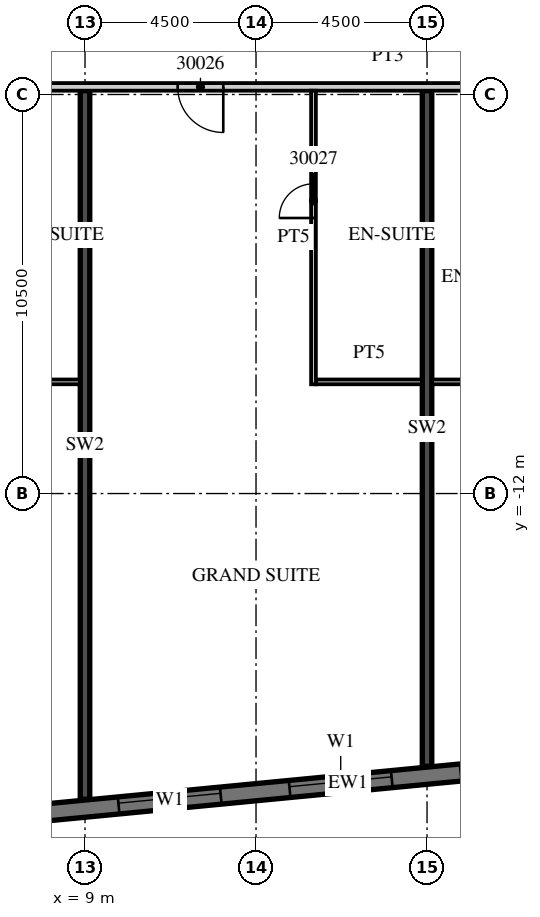
"""IFC4 building model, lengths in metres.
Left out: names, types, materials, properties, quantities, classifications, styles, units other than length and angle.
Written with IfcOpenShell. Run it as: python <this file> out.ifc"""

import sys

from ifc_helpers import new_model, si_unit, direction, frame, frame_2d, origin, place, context, subcontext, project, spatial, rectangle, extrude, element, fill, save


model = new_model("IFC4")
c1 = context("Model", 3, precision=1e-05, world=origin(), true_north=direction((0.0, 1.0)))
c2 = subcontext(c1, "Body", "Model", "MODEL_VIEW")
j1 = project(units=[si_unit("LENGTHUNIT", "METRE"), si_unit("PLANEANGLEUNIT", "RADIAN")], contexts=[c1])
p1 = place(None, origin())
s1 = spatial("IfcSite", under=j1, at=p1, CompositionType="ELEMENT")
p2 = place(p1, origin())
s2 = spatial("IfcBuilding", under=s1, at=p2, CompositionType="ELEMENT")
p3 = place(p2, frame((0.0, 0.0, 133.9)))
s3 = spatial("IfcBuildingStorey", under=s2, at=p3, CompositionType="ELEMENT", Elevation=133.9)
p4 = place(p3, frame((9.0, -20.044, 0.0), z_axis=(0.0, 0.0, 1.0), x_axis=(0.0, 1.0, 0.0)))
e1 = element("IfcWall", 1, at=p4, inside=s3, PredefinedType="SHEAR", context=c2, shape_type="SweptSolid", body=[
    extrude(rectangle(XDim=18.644, YDim=0.25, at=frame_2d((9.322, 0.0))), origin(), (0.0, 0.0, 1.0), 3.3),
])
p5 = place(p3, frame((18.0, -19.177, 0.0), z_axis=(0.0, 0.0, 1.0), x_axis=(0.0, 1.0, 0.0)))
e2 = element("IfcWall", 2, at=p5, inside=s3, PredefinedType="SHEAR", context=c2, shape_type="SweptSolid", body=[
    extrude(rectangle(XDim=17.777, YDim=0.25, at=frame_2d((8.889, 0.0))), origin(), (0.0, 0.0, 1.0), 3.3),
])
p6 = place(p3, frame((-13.521, -22.46, 0.0), z_axis=(0.0, 0.0, 1.0), x_axis=(0.995396096335, 0.095846812164, 0.0)))
e3 = element("IfcWall", 3, at=p6, inside=s3, PredefinedType="SOLIDWALL", context=c2, shape_type="SweptSolid", body=[
    extrude(rectangle(XDim=59.151, YDim=0.45, at=frame_2d((29.575, 0.0))), origin(), (0.0, 0.0, 1.0), 3.02),
])
p7 = place(p6, frame((0.91, 0.0, 0.45)))
e4 = element("IfcOpeningElement", 4, at=p7, cuts=e3, PredefinedType="OPENING", context=c2, shape_type="SweptSolid", body=[
    extrude(rectangle(XDim=2.7, YDim=2.25, at=frame_2d((1.35, 1.125))), frame((0.0, 0.235, 0.0), z_axis=(0.0, -1.0, 0.0), x_axis=(1.0, 0.0, 0.0)), (0.0, 0.0, 1.0), 0.47),
])
p8 = place(p6, frame((5.431, 0.0, 0.45)))
e5 = element("IfcOpeningElement", 5, at=p8, cuts=e3, PredefinedType="OPENING", context=c2, shape_type="SweptSolid", body=[
    extrude(rectangle(XDim=2.7, YDim=2.25, at=frame_2d((1.35, 1.125))), frame((0.0, 0.235, 0.0), z_axis=(0.0, -1.0, 0.0), x_axis=(1.0, 0.0, 0.0)), (0.0, 0.0, 1.0), 0.47),
])
p9 = place(p6, frame((9.952, 0.0, 0.45)))
e6 = element("IfcOpeningElement", 6, at=p9, cuts=e3, PredefinedType="OPENING", context=c2, shape_type="SweptSolid", body=[
    extrude(rectangle(XDim=2.7, YDim=2.25, at=frame_2d((1.35, 1.125))), frame((0.0, 0.235, 0.0), z_axis=(0.0, -1.0, 0.0), x_axis=(1.0, 0.0, 0.0)), (0.0, 0.0, 1.0), 0.47),
])
p10 = place(p6, frame((14.473, 0.0, 0.45)))
e7 = element("IfcOpeningElement", 7, at=p10, cuts=e3, PredefinedType="OPENING", context=c2, shape_type="SweptSolid", body=[
    extrude(rectangle(XDim=2.7, YDim=2.25, at=frame_2d((1.35, 1.125))), frame((0.0, 0.235, 0.0), z_axis=(0.0, -1.0, 0.0), x_axis=(1.0, 0.0, 0.0)), (0.0, 0.0, 1.0), 0.47),
])
p11 = place(p6, frame((18.994, 0.0, 0.45)))
e8 = element("IfcOpeningElement", 8, at=p11, cuts=e3, PredefinedType="OPENING", context=c2, shape_type="SweptSolid", body=[
    extrude(rectangle(XDim=2.7, YDim=2.25, at=frame_2d((1.35, 1.125))), frame((0.0, 0.235, 0.0), z_axis=(0.0, -1.0, 0.0), x_axis=(1.0, 0.0, 0.0)), (0.0, 0.0, 1.0), 0.47),
])
p12 = place(p6, frame((23.514, 0.0, 0.45)))
e9 = element("IfcOpeningElement", 9, at=p12, cuts=e3, PredefinedType="OPENING", context=c2, shape_type="SweptSolid", body=[
    extrude(rectangle(XDim=2.7, YDim=2.25, at=frame_2d((1.35, 1.125))), frame((0.0, 0.235, 0.0), z_axis=(0.0, -1.0, 0.0), x_axis=(1.0, 0.0, 0.0)), (0.0, 0.0, 1.0), 0.47),
])
p13 = place(p6, frame((28.035, 0.0, 0.45)))
e10 = element("IfcOpeningElement", 10, at=p13, cuts=e3, PredefinedType="OPENING", context=c2, shape_type="SweptSolid", body=[
    extrude(rectangle(XDim=2.7, YDim=2.25, at=frame_2d((1.35, 1.125))), frame((0.0, 0.235, 0.0), z_axis=(0.0, -1.0, 0.0), x_axis=(1.0, 0.0, 0.0)), (0.0, 0.0, 1.0), 0.47),
])
p14 = place(p6, frame((32.556, 0.0, 0.45)))
e11 = element("IfcOpeningElement", 11, at=p14, cuts=e3, PredefinedType="OPENING", context=c2, shape_type="SweptSolid", body=[
    extrude(rectangle(XDim=2.7, YDim=2.25, at=frame_2d((1.35, 1.125))), frame((0.0, 0.235, 0.0), z_axis=(0.0, -1.0, 0.0), x_axis=(1.0, 0.0, 0.0)), (0.0, 0.0, 1.0), 0.47),
])
p15 = place(p6, frame((37.077, 0.0, 0.45)))
e12 = element("IfcOpeningElement", 12, at=p15, cuts=e3, PredefinedType="OPENING", context=c2, shape_type="SweptSolid", body=[
    extrude(rectangle(XDim=2.7, YDim=2.25, at=frame_2d((1.35, 1.125))), frame((0.0, 0.235, 0.0), z_axis=(0.0, -1.0, 0.0), x_axis=(1.0, 0.0, 0.0)), (0.0, 0.0, 1.0), 0.47),
])
p16 = place(p6, frame((41.598, 0.0, 0.45)))
e13 = element("IfcOpeningElement", 13, at=p16, cuts=e3, PredefinedType="OPENING", context=c2, shape_type="SweptSolid", body=[
    extrude(rectangle(XDim=2.7, YDim=2.25, at=frame_2d((1.35, 1.125))), frame((0.0, 0.235, 0.0), z_axis=(0.0, -1.0, 0.0), x_axis=(1.0, 0.0, 0.0)), (0.0, 0.0, 1.0), 0.47),
])
p17 = place(p6, frame((46.118, 0.0, 0.45)))
e14 = element("IfcOpeningElement", 14, at=p17, cuts=e3, PredefinedType="OPENING", context=c2, shape_type="SweptSolid", body=[
    extrude(rectangle(XDim=2.7, YDim=2.25, at=frame_2d((1.35, 1.125))), frame((0.0, 0.235, 0.0), z_axis=(0.0, -1.0, 0.0), x_axis=(1.0, 0.0, 0.0)), (0.0, 0.0, 1.0), 0.47),
])
p18 = place(p6, frame((50.639, 0.0, 0.45)))
e15 = element("IfcOpeningElement", 15, at=p18, cuts=e3, PredefinedType="OPENING", context=c2, shape_type="SweptSolid", body=[
    extrude(rectangle(XDim=2.7, YDim=2.25, at=frame_2d((1.35, 1.125))), frame((0.0, 0.235, 0.0), z_axis=(0.0, -1.0, 0.0), x_axis=(1.0, 0.0, 0.0)), (0.0, 0.0, 1.0), 0.47),
])
p19 = place(p6, frame((55.15, 0.0, 0.45)))
e16 = element("IfcOpeningElement", 16, at=p19, cuts=e3, PredefinedType="OPENING", context=c2, shape_type="SweptSolid", body=[
    extrude(rectangle(XDim=2.7, YDim=2.25, at=frame_2d((1.35, 1.125))), frame((0.0, 0.235, 0.0), z_axis=(0.0, -1.0, 0.0), x_axis=(1.0, 0.0, 0.0)), (0.0, 0.0, 1.0), 0.47),
])
p20 = place(p3, frame((-13.5, -1.3, 0.0), z_axis=(0.0, 0.0, 1.0), x_axis=(1.0, 0.0, 0.0)))
e17 = element("IfcWall", 17, at=p20, inside=s3, PredefinedType="PARTITIONING", context=c2, shape_type="SweptSolid", body=[
    extrude(rectangle(XDim=60.932, YDim=0.2, at=frame_2d((30.466, 0.0))), origin(), (0.0, 0.0, 1.0), 3.02),
])
p21 = place(p20, frame((2.925, 0.0, 0.0)))
e18 = element("IfcOpeningElement", 18, at=p21, cuts=e17, PredefinedType="OPENING", context=c2, shape_type="SweptSolid", body=[
    extrude(rectangle(XDim=1.0, YDim=2.1, at=frame_2d((0.5, 1.05))), frame((0.0, 0.11, 0.0), z_axis=(0.0, -1.0, 0.0), x_axis=(1.0, 0.0, 0.0)), (0.0, 0.0, 1.0), 0.22),
])
p22 = place(p20, frame((9.863, 0.0, 0.0)))
e19 = element("IfcOpeningElement", 19, at=p22, cuts=e17, PredefinedType="OPENING", context=c2, shape_type="SweptSolid", body=[
    extrude(rectangle(XDim=1.2, YDim=2.1, at=frame_2d((0.6, 1.05))), frame((0.0, 0.11, 0.0), z_axis=(0.0, -1.0, 0.0), x_axis=(1.0, 0.0, 0.0)), (0.0, 0.0, 1.0), 0.22),
])
p23 = place(p20, frame((14.075, 0.0, 0.0)))
e20 = element("IfcOpeningElement", 20, at=p23, cuts=e17, PredefinedType="OPENING", context=c2, shape_type="SweptSolid", body=[
    extrude(rectangle(XDim=1.0, YDim=2.1, at=frame_2d((0.5, 1.05))), frame((0.0, 0.11, 0.0), z_axis=(0.0, -1.0, 0.0), x_axis=(1.0, 0.0, 0.0)), (0.0, 0.0, 1.0), 0.22),
])
p24 = place(p20, frame((18.55, 0.0, 0.0)))
e21 = element("IfcOpeningElement", 21, at=p24, cuts=e17, PredefinedType="OPENING", context=c2, shape_type="SweptSolid", body=[
    extrude(rectangle(XDim=1.0, YDim=2.1, at=frame_2d((0.5, 1.05))), frame((0.0, 0.11, 0.0), z_axis=(0.0, -1.0, 0.0), x_axis=(1.0, 0.0, 0.0)), (0.0, 0.0, 1.0), 0.22),
])
p25 = place(p20, frame((24.938, 0.0, 0.0)))
e22 = element("IfcOpeningElement", 22, at=p25, cuts=e17, PredefinedType="OPENING", context=c2, shape_type="SweptSolid", body=[
    extrude(rectangle(XDim=1.2, YDim=2.1, at=frame_2d((0.6, 1.05))), frame((0.0, 0.11, 0.0), z_axis=(0.0, -1.0, 0.0), x_axis=(1.0, 0.0, 0.0)), (0.0, 0.0, 1.0), 0.22),
])
p26 = place(p20, frame((36.862, 0.0, 0.0)))
e23 = element("IfcOpeningElement", 23, at=p26, cuts=e17, PredefinedType="OPENING", context=c2, shape_type="SweptSolid", body=[
    extrude(rectangle(XDim=1.2, YDim=2.1, at=frame_2d((0.6, 1.05))), frame((0.0, 0.11, 0.0), z_axis=(0.0, -1.0, 0.0), x_axis=(1.0, 0.0, 0.0)), (0.0, 0.0, 1.0), 0.22),
])
p27 = place(p20, frame((41.075, 0.0, 0.0)))
e24 = element("IfcOpeningElement", 24, at=p27, cuts=e17, PredefinedType="OPENING", context=c2, shape_type="SweptSolid", body=[
    extrude(rectangle(XDim=1.0, YDim=2.1, at=frame_2d((0.5, 1.05))), frame((0.0, 0.11, 0.0), z_axis=(0.0, -1.0, 0.0), x_axis=(1.0, 0.0, 0.0)), (0.0, 0.0, 1.0), 0.22),
])
p28 = place(p20, frame((45.55, 0.0, 0.0)))
e25 = element("IfcOpeningElement", 25, at=p28, cuts=e17, PredefinedType="OPENING", context=c2, shape_type="SweptSolid", body=[
    extrude(rectangle(XDim=1.0, YDim=2.1, at=frame_2d((0.5, 1.05))), frame((0.0, 0.11, 0.0), z_axis=(0.0, -1.0, 0.0), x_axis=(1.0, 0.0, 0.0)), (0.0, 0.0, 1.0), 0.22),
])
p29 = place(p20, frame((52.425, 0.0, 0.0)))
e26 = element("IfcOpeningElement", 26, at=p29, cuts=e17, PredefinedType="OPENING", context=c2, shape_type="SweptSolid", body=[
    extrude(rectangle(XDim=1.0, YDim=2.1, at=frame_2d((0.5, 1.05))), frame((0.0, 0.11, 0.0), z_axis=(0.0, -1.0, 0.0), x_axis=(1.0, 0.0, 0.0)), (0.0, 0.0, 1.0), 0.22),
])
p30 = place(p20, frame((56.95, 0.0, 0.0)))
e27 = element("IfcOpeningElement", 27, at=p30, cuts=e17, PredefinedType="OPENING", context=c2, shape_type="SweptSolid", body=[
    extrude(rectangle(XDim=1.0, YDim=2.1, at=frame_2d((0.5, 1.05))), frame((0.0, 0.11, 0.0), z_axis=(0.0, -1.0, 0.0), x_axis=(1.0, 0.0, 0.0)), (0.0, 0.0, 1.0), 0.22),
])
p31 = place(p20, frame((59.882, 0.0, 0.0)))
e28 = element("IfcOpeningElement", 28, at=p31, cuts=e17, PredefinedType="OPENING", context=c2, shape_type="SweptSolid", body=[
    extrude(rectangle(XDim=0.9, YDim=2.1, at=frame_2d((0.45, 1.05))), frame((0.0, 0.11, 0.0), z_axis=(0.0, -1.0, 0.0), x_axis=(1.0, 0.0, 0.0)), (0.0, 0.0, 1.0), 0.22),
])
p32 = place(p3, frame((6.625, -9.062, 0.0), z_axis=(0.0, 0.0, 1.0), x_axis=(1.0, 0.0, 0.0)))
e29 = element("IfcWall", 29, at=p32, inside=s3, PredefinedType="PARTITIONING", context=c2, shape_type="SweptSolid", body=[
    extrude(rectangle(XDim=2.25, YDim=0.125, at=frame_2d((1.125, 0.0))), origin(), (0.0, 0.0, 1.0), 3.02),
])
p33 = place(p3, frame((15.012, -9.125, 0.0), z_axis=(0.0, 0.0, 1.0), x_axis=(0.0, 1.0, 0.0)))
e30 = element("IfcWall", 30, at=p33, inside=s3, PredefinedType="PARTITIONING", context=c2, shape_type="SweptSolid", body=[
    extrude(rectangle(XDim=7.725, YDim=0.125, at=frame_2d((3.863, 0.0))), origin(), (0.0, 0.0, 1.0), 3.02),
])
p34 = place(p33, frame((4.375, 0.0, 0.0)))
e31 = element("IfcOpeningElement", 31, at=p34, cuts=e30, PredefinedType="OPENING", context=c2, shape_type="SweptSolid", body=[
    extrude(rectangle(XDim=0.9, YDim=2.1, at=frame_2d((0.45, 1.05))), frame((0.0, 0.073, 0.0), z_axis=(0.0, -1.0, 0.0), x_axis=(1.0, 0.0, 0.0)), (0.0, 0.0, 1.0), 0.145),
])
for number, where, z_axis, x_axis in (
    (32, (15.075, -9.062, 0.0), (0.0, 0.0, 1.0), (1.0, 0.0, 0.0)),
    (33, (18.125, -9.062, 0.0), (0.0, 0.0, 1.0), (1.0, 0.0, 0.0)),
):
    element("IfcWall", number, at=place(p3, frame(where, z_axis=z_axis, x_axis=x_axis)), inside=s3, PredefinedType="PARTITIONING", context=c2, shape_type="SweptSolid", body=[
        extrude(rectangle(XDim=2.8, YDim=0.125, at=frame_2d((1.4, 0.0))), origin(), (0.0, 0.0, 1.0), 3.02),
    ])
p35 = place(p12, origin())
e34 = element("IfcWindow", 34, at=p35, inside=s3, PartitioningType="SINGLE_PANEL", PredefinedType="WINDOW", context=c2, shape_type="SweptSolid", body=[
    extrude(rectangle(XDim=2.7, YDim=2.25, at=frame_2d((1.35, 1.125))), frame((0.0, 0.09, 0.0), z_axis=(0.0, -1.0, 0.0), x_axis=(1.0, 0.0, 0.0)), (0.0, 0.0, 1.0), 0.06),
])
fill(e9, e34)
p36 = place(p13, origin())
e35 = element("IfcWindow", 35, at=p36, inside=s3, PartitioningType="SINGLE_PANEL", PredefinedType="WINDOW", context=c2, shape_type="SweptSolid", body=[
    extrude(rectangle(XDim=2.7, YDim=2.25, at=frame_2d((1.35, 1.125))), frame((0.0, 0.09, 0.0), z_axis=(0.0, -1.0, 0.0), x_axis=(1.0, 0.0, 0.0)), (0.0, 0.0, 1.0), 0.06),
])
fill(e10, e35)
p37 = place(p25, origin())
e36 = element("IfcDoor", 36, at=p37, inside=s3, OperationType="SINGLE_SWING_RIGHT", PredefinedType="DOOR", context=c2, shape_type="SweptSolid", body=[
    extrude(rectangle(XDim=1.2, YDim=2.1, at=frame_2d((0.6, 1.05))), frame((0.0, 0.025, 0.0), z_axis=(0.0, -1.0, 0.0), x_axis=(1.0, 0.0, 0.0)), (0.0, 0.0, 1.0), 0.05),
])
fill(e22, e36)
p38 = place(p34, origin())
e37 = element("IfcDoor", 37, at=p38, inside=s3, OperationType="SINGLE_SWING_LEFT", PredefinedType="DOOR", context=c2, shape_type="SweptSolid", body=[
    extrude(rectangle(XDim=0.9, YDim=2.1, at=frame_2d((0.45, 1.05))), frame((0.0, 0.025, 0.0), z_axis=(0.0, -1.0, 0.0), x_axis=(1.0, 0.0, 0.0)), (0.0, 0.0, 1.0), 0.05),
])
fill(e31, e37)
save(model, sys.argv[1])
